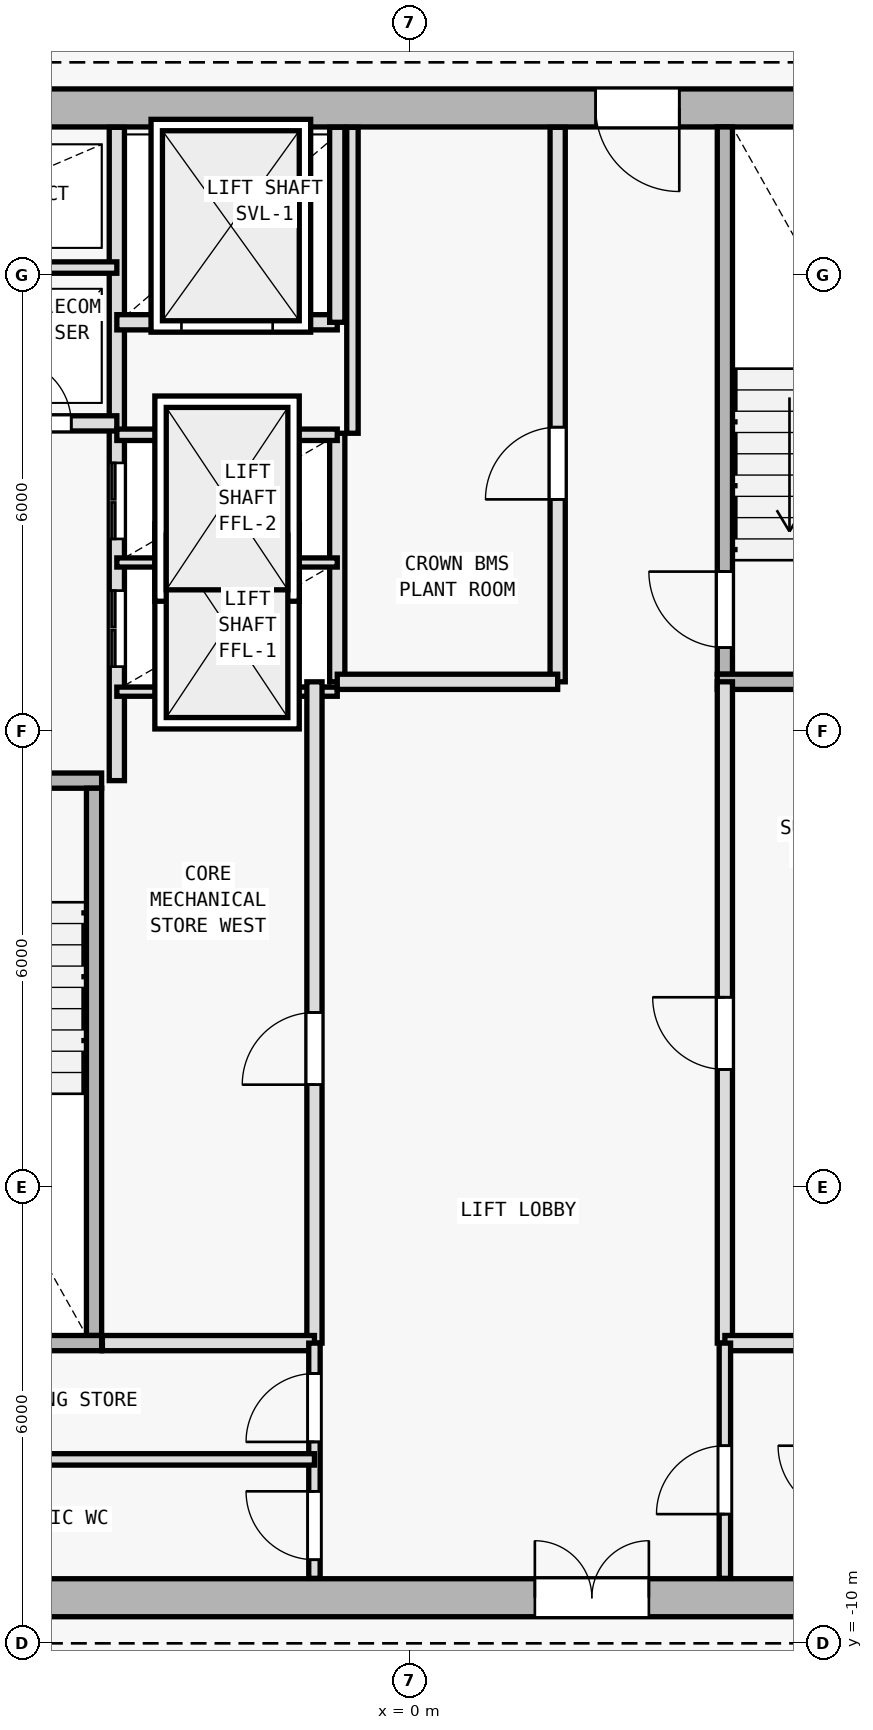
"""IFC4 building model, lengths in metres.
Left out: names, types, materials, properties, quantities, classifications, styles, units other than length and angle.
Written with IfcOpenShell. Run it as: python <this file> out.ifc"""

import sys

from ifc_helpers import new_model, si_unit, direction, frame, frame_2d, origin, origin_2d, place, context, subcontext, project, spatial, rectangle, i_section, extrude, element, fill, save


model = new_model("IFC4")
c1 = context("Model", 3, precision=1e-05, world=origin(), true_north=direction((0.0, 1.0)))
c2 = subcontext(c1, "Body", "Model", "MODEL_VIEW")
j1 = project(units=[si_unit("LENGTHUNIT", "METRE"), si_unit("PLANEANGLEUNIT", "RADIAN")], contexts=[c1])
p1 = place(None, origin())
s1 = spatial("IfcSite", under=j1, at=p1, CompositionType="ELEMENT")
p2 = place(p1, origin())
s2 = spatial("IfcBuilding", under=s1, at=p2, CompositionType="ELEMENT")
p3 = place(p2, frame((0.0, 0.0, 308.4)))
s3 = spatial("IfcBuildingStorey", under=s2, at=p3, CompositionType="ELEMENT", Elevation=308.4)
p4 = place(p3, frame((0.0, -9.4, 0.0), z_axis=(0.0, 0.0, 1.0), x_axis=(1.0, 0.0, 0.0)))
e1 = element("IfcColumn", 1, at=p4, inside=s3, PredefinedType="COLUMN", context=c2, shape_type="SweptSolid", body=[
    extrude(i_section(OverallWidth=0.374, OverallDepth=0.372, WebThickness=0.012, FlangeThickness=0.02, FilletRadius=0.015, at=origin_2d()), origin(), (0.0, 0.0, 1.0), 3.6),
])
p5 = place(p3, frame((-7.95, -9.4, 0.0), z_axis=(0.0, 0.0, 1.0), x_axis=(1.0, 0.0, 0.0)))
e2 = element("IfcWall", 2, at=p5, inside=s3, PredefinedType="SHEAR", context=c2, shape_type="SweptSolid", body=[
    extrude(rectangle(XDim=15.9, YDim=0.5, at=frame_2d((7.95, 0.0))), origin(), (0.0, 0.0, 1.0), 3.34),
])
p6 = place(p5, frame((9.6, 0.0, 0.0)))
e3 = element("IfcOpeningElement", 3, at=p6, cuts=e2, PredefinedType="OPENING", context=c2, shape_type="SweptSolid", body=[
    extrude(rectangle(XDim=1.5, YDim=2.2, at=frame_2d((0.75, 1.1))), frame((0.0, 0.26, 0.0), z_axis=(0.0, -1.0, 0.0), x_axis=(1.0, 0.0, 0.0)), (0.0, 0.0, 1.0), 0.52),
])
p7 = place(p3, frame((7.95, 10.2, 0.0), z_axis=(0.0, 0.0, 1.0), x_axis=(-1.0, 0.0, 0.0)))
e4 = element("IfcWall", 4, at=p7, inside=s3, PredefinedType="SHEAR", context=c2, shape_type="SweptSolid", body=[
    extrude(rectangle(XDim=15.9, YDim=0.5, at=frame_2d((7.95, 0.0))), origin(), (0.0, 0.0, 1.0), 3.34),
])
p8 = place(p7, frame((4.4, 0.0, 0.0)))
e5 = element("IfcOpeningElement", 5, at=p8, cuts=e4, PredefinedType="OPENING", context=c2, shape_type="SweptSolid", body=[
    extrude(rectangle(XDim=1.1, YDim=2.15, at=frame_2d((0.55, 1.075))), frame((0.0, 0.26, 0.0), z_axis=(0.0, -1.0, 0.0), x_axis=(1.0, 0.0, 0.0)), (0.0, 0.0, 1.0), 0.52),
])
p9 = place(p3, frame((-7.45, 1.35, 0.0), z_axis=(0.0, 0.0, 1.0), x_axis=(1.0, 0.0, 0.0)))
e6 = element("IfcWall", 6, at=p9, inside=s3, PredefinedType="SOLIDWALL", context=c2, shape_type="SweptSolid", body=[
    extrude(rectangle(XDim=3.4, YDim=0.2, at=frame_2d((1.7, 0.0))), origin(), (0.0, 0.0, 1.0), 3.34),
])
p10 = place(p9, frame((0.65, 0.0, 0.0)))
e7 = element("IfcOpeningElement", 7, at=p10, cuts=e6, PredefinedType="OPENING", context=c2, shape_type="SweptSolid", body=[
    extrude(rectangle(XDim=1.0, YDim=2.15, at=frame_2d((0.5, 1.075))), frame((0.0, 0.11, 0.0), z_axis=(0.0, -1.0, 0.0), x_axis=(1.0, 0.0, 0.0)), (0.0, 0.0, 1.0), 0.22),
])
p11 = place(p3, frame((-4.15, -5.95, 0.0), z_axis=(0.0, 0.0, 1.0), x_axis=(0.0, 1.0, 0.0)))
e8 = element("IfcWall", 8, at=p11, inside=s3, PredefinedType="SOLIDWALL", context=c2, shape_type="SweptSolid", body=[
    extrude(rectangle(XDim=7.2, YDim=0.2, at=frame_2d((3.6, 0.0))), origin(), (0.0, 0.0, 1.0), 3.34),
])
p12 = place(p3, frame((-3.85, 1.35, 0.0), z_axis=(0.0, 0.0, 1.0), x_axis=(0.0, 1.0, 0.0)))
e9 = element("IfcWall", 9, at=p12, inside=s3, PredefinedType="SOLIDWALL", context=c2, shape_type="SweptSolid", body=[
    extrude(rectangle(XDim=8.595, YDim=0.2, at=frame_2d((4.297, 0.0))), origin(), (0.0, 0.0, 1.0), 3.34),
])
p13 = place(p12, frame((1.5, 0.0, 0.0)))
e10 = element("IfcOpeningElement", 10, at=p13, cuts=e9, PredefinedType="OPENING", context=c2, shape_type="SweptSolid", body=[
    extrude(rectangle(XDim=1.0, YDim=2.15, at=frame_2d((0.5, 1.075))), frame((0.0, 0.11, 0.0), z_axis=(0.0, -1.0, 0.0), x_axis=(1.0, 0.0, 0.0)), (0.0, 0.0, 1.0), 0.22),
])
p14 = place(p12, frame((3.18, 0.0, 0.0)))
e11 = element("IfcOpeningElement", 11, at=p14, cuts=e9, PredefinedType="OPENING", context=c2, shape_type="SweptSolid", body=[
    extrude(rectangle(XDim=1.0, YDim=2.15, at=frame_2d((0.5, 1.075))), frame((0.0, 0.11, 0.0), z_axis=(0.0, -1.0, 0.0), x_axis=(1.0, 0.0, 0.0)), (0.0, 0.0, 1.0), 0.22),
])
p15 = place(p3, frame((-7.445, 6.05, 0.0), z_axis=(0.0, 0.0, 1.0), x_axis=(1.0, 0.0, 0.0)))
e12 = element("IfcWall", 12, at=p15, inside=s3, PredefinedType="SOLIDWALL", context=c2, shape_type="SweptSolid", body=[
    extrude(rectangle(XDim=3.595, YDim=0.2, at=frame_2d((1.797, 0.0))), origin(), (0.0, 0.0, 1.0), 3.34),
])
p16 = place(p15, frame((0.345, 0.0, 0.0)))
e13 = element("IfcOpeningElement", 13, at=p16, cuts=e12, PredefinedType="OPENING", context=c2, shape_type="SweptSolid", body=[
    extrude(rectangle(XDim=0.85, YDim=2.1, at=frame_2d((0.425, 1.05))), frame((0.0, 0.11, 0.0), z_axis=(0.0, -1.0, 0.0), x_axis=(1.0, 0.0, 0.0)), (0.0, 0.0, 1.0), 0.22),
])
p17 = place(p15, frame((2.145, 0.0, 0.0)))
e14 = element("IfcOpeningElement", 14, at=p17, cuts=e12, PredefinedType="OPENING", context=c2, shape_type="SweptSolid", body=[
    extrude(rectangle(XDim=0.85, YDim=2.1, at=frame_2d((0.425, 1.05))), frame((0.0, 0.11, 0.0), z_axis=(0.0, -1.0, 0.0), x_axis=(1.0, 0.0, 0.0)), (0.0, 0.0, 1.0), 0.22),
])
p18 = place(p3, frame((-7.445, 8.1, 0.0), z_axis=(0.0, 0.0, 1.0), x_axis=(1.0, 0.0, 0.0)))
e15 = element("IfcWall", 15, at=p18, inside=s3, PredefinedType="PARTITIONING", context=c2, shape_type="SweptSolid", body=[
    extrude(rectangle(XDim=3.595, YDim=0.15, at=frame_2d((1.797, 0.0))), origin(), (0.0, 0.0, 1.0), 3.34),
])
p19 = place(p3, frame((4.15, 2.75, 0.0), z_axis=(0.0, 0.0, 1.0), x_axis=(0.0, 1.0, 0.0)))
e16 = element("IfcWall", 16, at=p19, inside=s3, PredefinedType="SOLIDWALL", context=c2, shape_type="SweptSolid", body=[
    extrude(rectangle(XDim=7.2, YDim=0.2, at=frame_2d((3.6, 0.0))), origin(), (0.0, 0.0, 1.0), 3.34),
])
p20 = place(p19, frame((0.35, 0.0, 0.0)))
e17 = element("IfcOpeningElement", 17, at=p20, cuts=e16, PredefinedType="OPENING", context=c2, shape_type="SweptSolid", body=[
    extrude(rectangle(XDim=1.0, YDim=2.15, at=frame_2d((0.5, 1.075))), frame((0.0, 0.11, 0.0), z_axis=(0.0, -1.0, 0.0), x_axis=(1.0, 0.0, 0.0)), (0.0, 0.0, 1.0), 0.22),
])
p21 = place(p3, frame((4.05, 2.65, 0.0), z_axis=(0.0, 0.0, 1.0), x_axis=(1.0, 0.0, 0.0)))
e18 = element("IfcWall", 18, at=p21, inside=s3, PredefinedType="SOLIDWALL", context=c2, shape_type="SweptSolid", body=[
    extrude(rectangle(XDim=3.4, YDim=0.2, at=frame_2d((1.7, 0.0))), origin(), (0.0, 0.0, 1.0), 3.34),
])
p22 = place(p3, frame((-0.95, 2.65, 0.0), z_axis=(0.0, 0.0, 1.0), x_axis=(0.0, 1.0, 0.0)))
e19 = element("IfcWall", 19, at=p22, inside=s3, PredefinedType="SOLIDWALL", context=c2, shape_type="SweptSolid", body=[
    extrude(rectangle(XDim=3.27, YDim=0.2, at=frame_2d((1.635, 0.0))), origin(), (0.0, 0.0, 1.0), 3.34),
])
for number, where, z_axis, x_axis in (
    (20, (-3.85, 2.52, 0.0), (0.0, 0.0, 1.0), (1.0, 0.0, 0.0)),
    (21, (-3.85, 4.22, 0.0), (0.0, 0.0, 1.0), (1.0, 0.0, 0.0)),
):
    element("IfcWall", number, at=place(p3, frame(where, z_axis=z_axis, x_axis=x_axis)), inside=s3, PredefinedType="PARTITIONING", context=c2, shape_type="SweptSolid", body=[
        extrude(rectangle(XDim=2.9, YDim=0.12, at=frame_2d((1.45, 0.0))), origin(), (0.0, 0.0, 1.0), 3.34),
    ])
p23 = place(p3, frame((-3.85, 5.9, 0.0), z_axis=(0.0, 0.0, 1.0), x_axis=(1.0, 0.0, 0.0)))
e22 = element("IfcWall", 22, at=p23, inside=s3, PredefinedType="PARTITIONING", context=c2, shape_type="SweptSolid", body=[
    extrude(rectangle(XDim=2.9, YDim=0.15, at=frame_2d((1.45, 0.0))), origin(), (0.0, 0.0, 1.0), 3.34),
])
p24 = place(p3, frame((-3.85, 7.38, 0.0), z_axis=(0.0, 0.0, 1.0), x_axis=(1.0, 0.0, 0.0)))
e23 = element("IfcWall", 23, at=p24, inside=s3, PredefinedType="SOLIDWALL", context=c2, shape_type="SweptSolid", body=[
    extrude(rectangle(XDim=2.9, YDim=0.2, at=frame_2d((1.45, 0.0))), origin(), (0.0, 0.0, 1.0), 3.34),
])
p25 = place(p24, frame((0.85, 0.0, 0.0)))
e24 = element("IfcOpeningElement", 24, at=p25, cuts=e23, PredefinedType="OPENING", context=c2, shape_type="SweptSolid", body=[
    extrude(rectangle(XDim=1.2, YDim=2.2, at=frame_2d((0.6, 1.1))), frame((0.0, 0.11, 0.0), z_axis=(0.0, -1.0, 0.0), x_axis=(1.0, 0.0, 0.0)), (0.0, 0.0, 1.0), 0.22),
])
p26 = place(p3, frame((-0.95, 7.38, 0.0), z_axis=(0.0, 0.0, 1.0), x_axis=(0.0, 1.0, 0.0)))
e25 = element("IfcWall", 25, at=p26, inside=s3, PredefinedType="SOLIDWALL", context=c2, shape_type="SweptSolid", body=[
    extrude(rectangle(XDim=2.565, YDim=0.2, at=frame_2d((1.283, 0.0))), origin(), (0.0, 0.0, 1.0), 3.34),
])
p27 = place(p3, frame((4.15, -6.05, 0.0), z_axis=(0.0, 0.0, 1.0), x_axis=(0.0, 1.0, 0.0)))
e26 = element("IfcWall", 26, at=p27, inside=s3, PredefinedType="SOLIDWALL", context=c2, shape_type="SweptSolid", body=[
    extrude(rectangle(XDim=8.7, YDim=0.2, at=frame_2d((4.35, 0.0))), origin(), (0.0, 0.0, 1.0), 3.34),
])
p28 = place(p27, frame((3.6, 0.0, 0.0)))
e27 = element("IfcOpeningElement", 27, at=p28, cuts=e26, PredefinedType="OPENING", context=c2, shape_type="SweptSolid", body=[
    extrude(rectangle(XDim=0.95, YDim=2.1, at=frame_2d((0.475, 1.05))), frame((0.0, 0.11, 0.0), z_axis=(0.0, -1.0, 0.0), x_axis=(1.0, 0.0, 0.0)), (0.0, 0.0, 1.0), 0.22),
])
p29 = place(p3, frame((-1.25, -6.05, 0.0), z_axis=(0.0, 0.0, 1.0), x_axis=(0.0, 1.0, 0.0)))
e28 = element("IfcWall", 28, at=p29, inside=s3, PredefinedType="SOLIDWALL", context=c2, shape_type="SweptSolid", body=[
    extrude(rectangle(XDim=8.7, YDim=0.2, at=frame_2d((4.35, 0.0))), origin(), (0.0, 0.0, 1.0), 3.34),
])
p30 = place(p29, frame((3.4, 0.0, 0.0)))
e29 = element("IfcOpeningElement", 29, at=p30, cuts=e28, PredefinedType="OPENING", context=c2, shape_type="SweptSolid", body=[
    extrude(rectangle(XDim=0.95, YDim=2.1, at=frame_2d((0.475, 1.05))), frame((0.0, 0.11, 0.0), z_axis=(0.0, -1.0, 0.0), x_axis=(1.0, 0.0, 0.0)), (0.0, 0.0, 1.0), 0.22),
])
p31 = place(p3, frame((1.95, 2.65, 0.0), z_axis=(0.0, 0.0, 1.0), x_axis=(0.0, 1.0, 0.0)))
e30 = element("IfcWall", 30, at=p31, inside=s3, PredefinedType="SOLIDWALL", context=c2, shape_type="SweptSolid", body=[
    extrude(rectangle(XDim=7.295, YDim=0.2, at=frame_2d((3.647, 0.0))), origin(), (0.0, 0.0, 1.0), 3.34),
])
p32 = place(p31, frame((2.4, 0.0, 0.0)))
e31 = element("IfcOpeningElement", 31, at=p32, cuts=e30, PredefinedType="OPENING", context=c2, shape_type="SweptSolid", body=[
    extrude(rectangle(XDim=0.95, YDim=2.1, at=frame_2d((0.475, 1.05))), frame((0.0, 0.11, 0.0), z_axis=(0.0, -1.0, 0.0), x_axis=(1.0, 0.0, 0.0)), (0.0, 0.0, 1.0), 0.22),
])
p33 = place(p3, frame((-0.95, 2.65, 0.0), z_axis=(0.0, 0.0, 1.0), x_axis=(1.0, 0.0, 0.0)))
e32 = element("IfcWall", 32, at=p33, inside=s3, PredefinedType="SOLIDWALL", context=c2, shape_type="SweptSolid", body=[
    extrude(rectangle(XDim=2.9, YDim=0.2, at=frame_2d((1.45, 0.0))), origin(), (0.0, 0.0, 1.0), 3.34),
])
p34 = place(p3, frame((-0.75, 5.92, 0.0), z_axis=(0.0, 0.0, 1.0), x_axis=(0.0, 1.0, 0.0)))
e33 = element("IfcWall", 33, at=p34, inside=s3, PredefinedType="PARTITIONING", context=c2, shape_type="SweptSolid", body=[
    extrude(rectangle(XDim=4.025, YDim=0.15, at=frame_2d((2.013, 0.0))), origin(), (0.0, 0.0, 1.0), 3.34),
])
p35 = place(p3, frame((-7.45, -6.05, 0.0), z_axis=(0.0, 0.0, 1.0), x_axis=(1.0, 0.0, 0.0)))
e34 = element("IfcWall", 34, at=p35, inside=s3, PredefinedType="SOLIDWALL", context=c2, shape_type="SweptSolid", body=[
    extrude(rectangle(XDim=3.4, YDim=0.2, at=frame_2d((1.7, 0.0))), origin(), (0.0, 0.0, 1.0), 3.34),
])
p36 = place(p3, frame((-4.04, -6.05, 0.0), z_axis=(0.0, 0.0, 1.0), x_axis=(1.0, 0.0, 0.0)))
e35 = element("IfcWall", 35, at=p36, inside=s3, PredefinedType="SOLIDWALL", context=c2, shape_type="SweptSolid", body=[
    extrude(rectangle(XDim=2.79, YDim=0.2, at=frame_2d((1.395, 0.0))), origin(), (0.0, 0.0, 1.0), 3.34),
])
p37 = place(p3, frame((4.15, -6.05, 0.0), z_axis=(0.0, 0.0, 1.0), x_axis=(1.0, 0.0, 0.0)))
e36 = element("IfcWall", 36, at=p37, inside=s3, PredefinedType="SOLIDWALL", context=c2, shape_type="SweptSolid", body=[
    extrude(rectangle(XDim=3.295, YDim=0.2, at=frame_2d((1.647, 0.0))), origin(), (0.0, 0.0, 1.0), 3.34),
])
p38 = place(p3, frame((-1.25, -9.145, 0.0), z_axis=(0.0, 0.0, 1.0), x_axis=(0.0, 1.0, 0.0)))
e37 = element("IfcWall", 37, at=p38, inside=s3, PredefinedType="PARTITIONING", context=c2, shape_type="SweptSolid", body=[
    extrude(rectangle(XDim=3.095, YDim=0.15, at=frame_2d((1.547, 0.0))), origin(), (0.0, 0.0, 1.0), 3.34),
])
p39 = place(p38, frame((1.795, 0.0, 0.0)))
e38 = element("IfcOpeningElement", 38, at=p39, cuts=e37, PredefinedType="OPENING", context=c2, shape_type="SweptSolid", body=[
    extrude(rectangle(XDim=0.9, YDim=2.1, at=frame_2d((0.45, 1.05))), frame((0.0, 0.085, 0.0), z_axis=(0.0, -1.0, 0.0), x_axis=(1.0, 0.0, 0.0)), (0.0, 0.0, 1.0), 0.17),
])
p40 = place(p38, frame((0.245, 0.0, 0.0)))
e39 = element("IfcOpeningElement", 39, at=p40, cuts=e37, PredefinedType="OPENING", context=c2, shape_type="SweptSolid", body=[
    extrude(rectangle(XDim=0.9, YDim=2.1, at=frame_2d((0.45, 1.05))), frame((0.0, 0.085, 0.0), z_axis=(0.0, -1.0, 0.0), x_axis=(1.0, 0.0, 0.0)), (0.0, 0.0, 1.0), 0.17),
])
p41 = place(p3, frame((4.15, -9.145, 0.0), z_axis=(0.0, 0.0, 1.0), x_axis=(0.0, 1.0, 0.0)))
e40 = element("IfcWall", 40, at=p41, inside=s3, PredefinedType="PARTITIONING", context=c2, shape_type="SweptSolid", body=[
    extrude(rectangle(XDim=3.095, YDim=0.15, at=frame_2d((1.547, 0.0))), origin(), (0.0, 0.0, 1.0), 3.34),
])
p42 = place(p41, frame((0.845, 0.0, 0.0)))
e41 = element("IfcOpeningElement", 41, at=p42, cuts=e40, PredefinedType="OPENING", context=c2, shape_type="SweptSolid", body=[
    extrude(rectangle(XDim=0.9, YDim=2.1, at=frame_2d((0.45, 1.05))), frame((0.0, 0.085, 0.0), z_axis=(0.0, -1.0, 0.0), x_axis=(1.0, 0.0, 0.0)), (0.0, 0.0, 1.0), 0.17),
])
p43 = place(p3, frame((-7.445, -7.58, 0.0), z_axis=(0.0, 0.0, 1.0), x_axis=(1.0, 0.0, 0.0)))
e42 = element("IfcWall", 42, at=p43, inside=s3, PredefinedType="PARTITIONING", context=c2, shape_type="SweptSolid", body=[
    extrude(rectangle(XDim=6.195, YDim=0.15, at=frame_2d((3.098, 0.0))), origin(), (0.0, 0.0, 1.0), 3.34),
])
p44 = place(p6, origin())
e43 = element("IfcDoor", 43, at=p44, inside=s3, OperationType="DOUBLE_DOOR_SINGLE_SWING", PredefinedType="DOOR", context=c2, shape_type="SweptSolid", body=[
    extrude(rectangle(XDim=1.5, YDim=2.2, at=frame_2d((0.75, 1.1))), frame((0.0, 0.025, 0.0), z_axis=(0.0, -1.0, 0.0), x_axis=(1.0, 0.0, 0.0)), (0.0, 0.0, 1.0), 0.05),
])
fill(e3, e43)
p45 = place(p8, origin())
e44 = element("IfcDoor", 44, at=p45, inside=s3, OperationType="SINGLE_SWING_LEFT", PredefinedType="DOOR", context=c2, shape_type="SweptSolid", body=[
    extrude(rectangle(XDim=1.1, YDim=2.15, at=frame_2d((0.55, 1.075))), frame((0.0, 0.025, 0.0), z_axis=(0.0, -1.0, 0.0), x_axis=(1.0, 0.0, 0.0)), (0.0, 0.0, 1.0), 0.05),
])
fill(e5, e44)
p46 = place(p17, origin())
e45 = element("IfcDoor", 45, at=p46, inside=s3, OperationType="SINGLE_SWING_LEFT", PredefinedType="DOOR", context=c2, shape_type="SweptSolid", body=[
    extrude(rectangle(XDim=0.85, YDim=2.1, at=frame_2d((0.425, 1.05))), frame((0.0, 0.025, 0.0), z_axis=(0.0, -1.0, 0.0), x_axis=(1.0, 0.0, 0.0)), (0.0, 0.0, 1.0), 0.05),
])
fill(e14, e45)
p47 = place(p20, origin())
e46 = element("IfcDoor", 46, at=p47, inside=s3, OperationType="SINGLE_SWING_RIGHT", PredefinedType="DOOR", context=c2, shape_type="SweptSolid", body=[
    extrude(rectangle(XDim=1.0, YDim=2.15, at=frame_2d((0.5, 1.075))), frame((0.0, 0.025, 0.0), z_axis=(0.0, -1.0, 0.0), x_axis=(1.0, 0.0, 0.0)), (0.0, 0.0, 1.0), 0.05),
])
fill(e17, e46)
p48 = place(p25, origin())
e47 = element("IfcDoor", 47, at=p48, inside=s3, OperationType="DOUBLE_DOOR_SLIDING", PredefinedType="DOOR", context=c2, shape_type="SweptSolid", body=[
    extrude(rectangle(XDim=1.2, YDim=2.2, at=frame_2d((0.6, 1.1))), frame((0.0, 0.025, 0.0), z_axis=(0.0, -1.0, 0.0), x_axis=(1.0, 0.0, 0.0)), (0.0, 0.0, 1.0), 0.05),
])
fill(e24, e47)
p49 = place(p28, origin())
e48 = element("IfcDoor", 48, at=p49, inside=s3, OperationType="SINGLE_SWING_RIGHT", PredefinedType="DOOR", context=c2, shape_type="SweptSolid", body=[
    extrude(rectangle(XDim=0.95, YDim=2.1, at=frame_2d((0.475, 1.05))), frame((0.0, 0.025, 0.0), z_axis=(0.0, -1.0, 0.0), x_axis=(1.0, 0.0, 0.0)), (0.0, 0.0, 1.0), 0.05),
])
fill(e27, e48)
p50 = place(p30, origin())
e49 = element("IfcDoor", 49, at=p50, inside=s3, OperationType="SINGLE_SWING_LEFT", PredefinedType="DOOR", context=c2, shape_type="SweptSolid", body=[
    extrude(rectangle(XDim=0.95, YDim=2.1, at=frame_2d((0.475, 1.05))), frame((0.0, 0.025, 0.0), z_axis=(0.0, -1.0, 0.0), x_axis=(1.0, 0.0, 0.0)), (0.0, 0.0, 1.0), 0.05),
])
fill(e29, e49)
p51 = place(p32, origin())
e50 = element("IfcDoor", 50, at=p51, inside=s3, OperationType="SINGLE_SWING_LEFT", PredefinedType="DOOR", context=c2, shape_type="SweptSolid", body=[
    extrude(rectangle(XDim=0.95, YDim=2.1, at=frame_2d((0.475, 1.05))), frame((0.0, 0.025, 0.0), z_axis=(0.0, -1.0, 0.0), x_axis=(1.0, 0.0, 0.0)), (0.0, 0.0, 1.0), 0.05),
])
fill(e31, e50)
p52 = place(p13, origin())
e51 = element("IfcDoor", 51, at=p52, inside=s3, OperationType="DOUBLE_DOOR_SLIDING", PredefinedType="DOOR", context=c2, shape_type="SweptSolid", body=[
    extrude(rectangle(XDim=1.0, YDim=2.15, at=frame_2d((0.5, 1.075))), frame((0.0, 0.025, 0.0), z_axis=(0.0, -1.0, 0.0), x_axis=(1.0, 0.0, 0.0)), (0.0, 0.0, 1.0), 0.05),
])
fill(e10, e51)
p53 = place(p14, origin())
e52 = element("IfcDoor", 52, at=p53, inside=s3, OperationType="DOUBLE_DOOR_SLIDING", PredefinedType="DOOR", context=c2, shape_type="SweptSolid", body=[
    extrude(rectangle(XDim=1.0, YDim=2.15, at=frame_2d((0.5, 1.075))), frame((0.0, 0.025, 0.0), z_axis=(0.0, -1.0, 0.0), x_axis=(1.0, 0.0, 0.0)), (0.0, 0.0, 1.0), 0.05),
])
fill(e11, e52)
p54 = place(p39, origin())
e53 = element("IfcDoor", 53, at=p54, inside=s3, OperationType="SINGLE_SWING_LEFT", PredefinedType="DOOR", context=c2, shape_type="SweptSolid", body=[
    extrude(rectangle(XDim=0.9, YDim=2.1, at=frame_2d((0.45, 1.05))), frame((0.0, 0.025, 0.0), z_axis=(0.0, -1.0, 0.0), x_axis=(1.0, 0.0, 0.0)), (0.0, 0.0, 1.0), 0.05),
])
fill(e38, e53)
p55 = place(p40, origin())
e54 = element("IfcDoor", 54, at=p55, inside=s3, OperationType="SINGLE_SWING_RIGHT", PredefinedType="DOOR", context=c2, shape_type="SweptSolid", body=[
    extrude(rectangle(XDim=0.9, YDim=2.1, at=frame_2d((0.45, 1.05))), frame((0.0, 0.025, 0.0), z_axis=(0.0, -1.0, 0.0), x_axis=(1.0, 0.0, 0.0)), (0.0, 0.0, 1.0), 0.05),
])
fill(e39, e54)
p56 = place(p42, origin())
e55 = element("IfcDoor", 55, at=p56, inside=s3, OperationType="SINGLE_SWING_LEFT", PredefinedType="DOOR", context=c2, shape_type="SweptSolid", body=[
    extrude(rectangle(XDim=0.9, YDim=2.1, at=frame_2d((0.45, 1.05))), frame((0.0, 0.025, 0.0), z_axis=(0.0, -1.0, 0.0), x_axis=(1.0, 0.0, 0.0)), (0.0, 0.0, 1.0), 0.05),
])
fill(e41, e55)
save(model, sys.argv[1])
